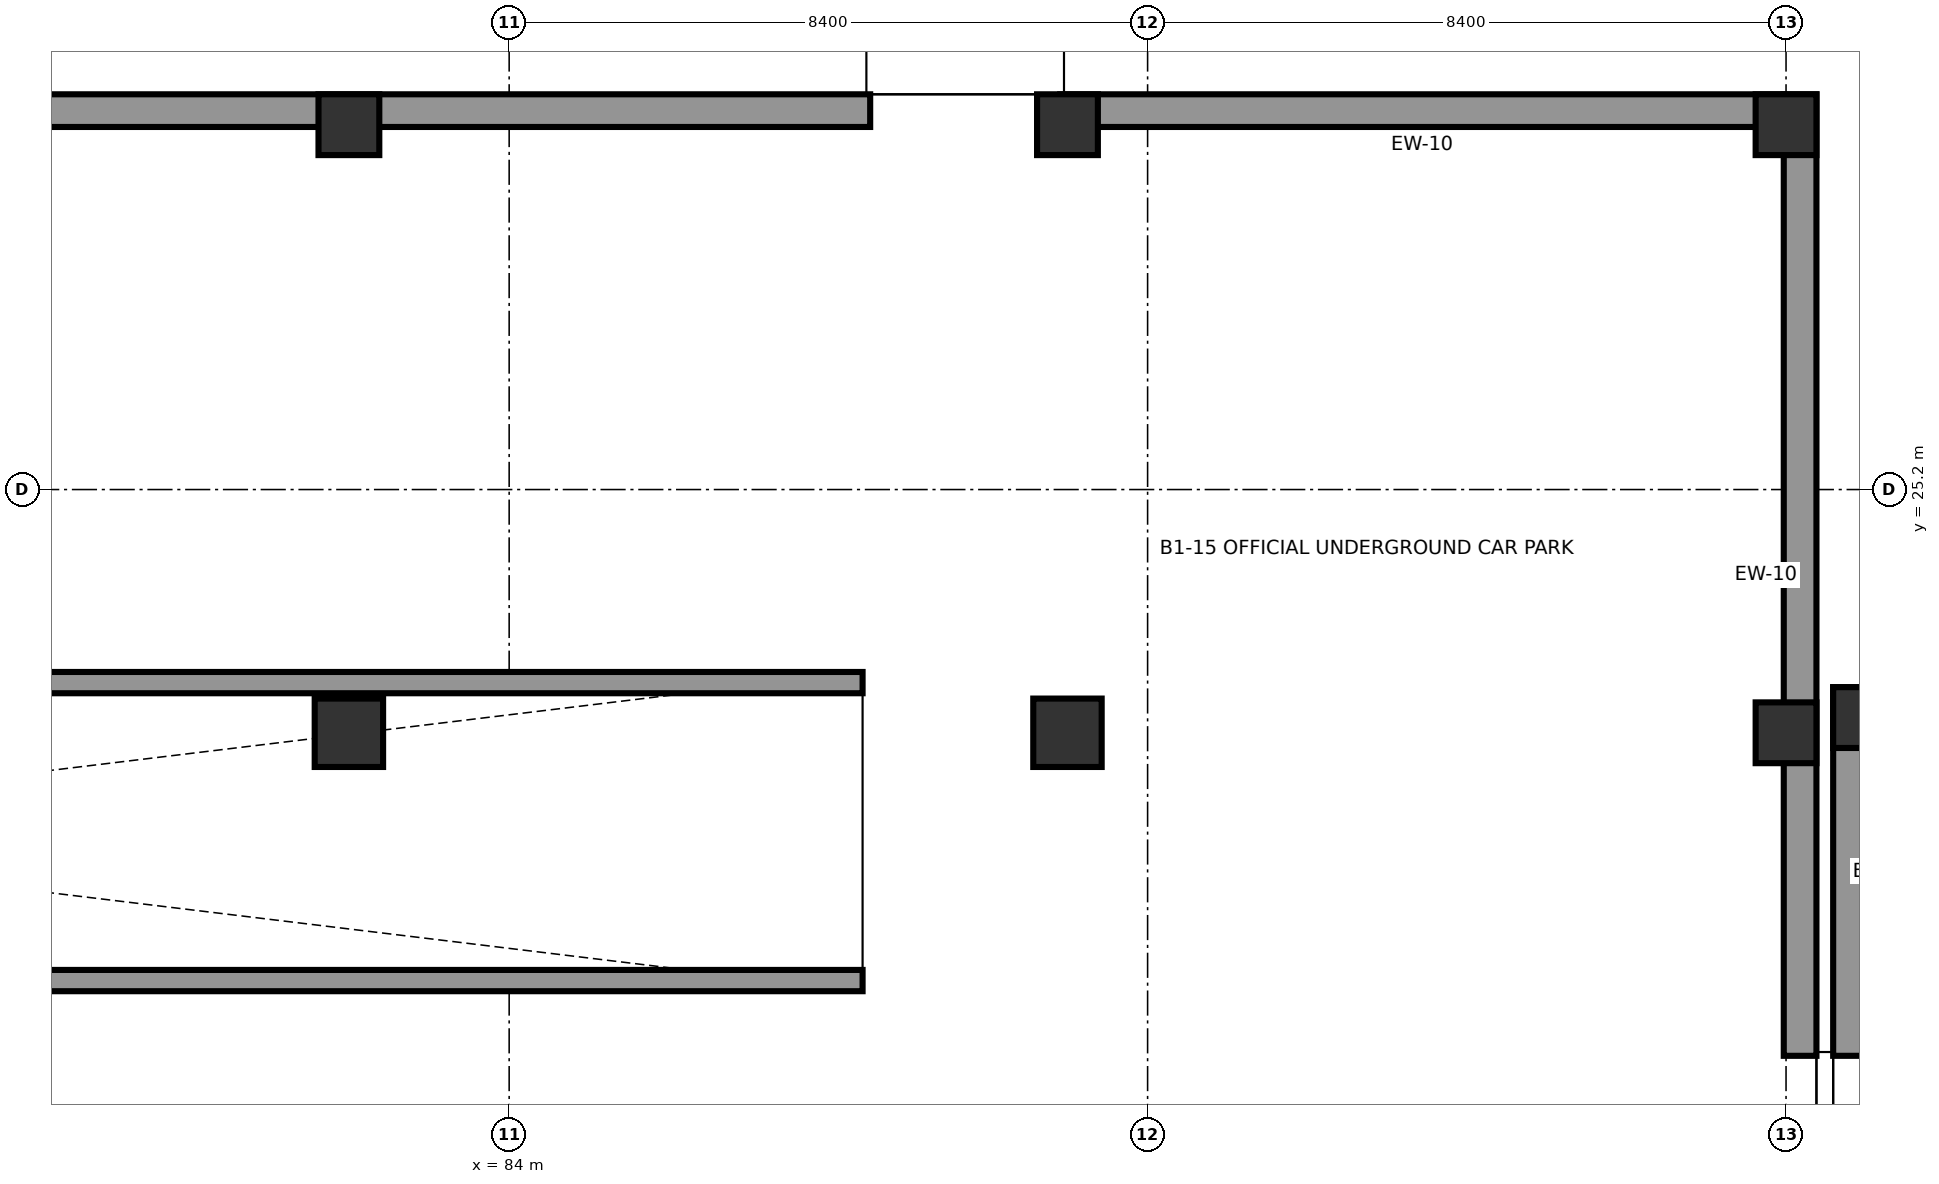
"""IFC4 building model, lengths in metres.
Left out: names, types, materials, properties, quantities, classifications, styles, units other than length and angle.
Written with IfcOpenShell. Run it as: python <this file> out.ifc"""

import sys

from ifc_helpers import new_model, si_unit, direction, frame, frame_2d, origin, origin_2d, place, context, subcontext, project, spatial, rectangle, extrude, element, save


model = new_model("IFC4")
c1 = context("Model", 3, precision=1e-05, world=origin(), true_north=direction((0.0, 1.0)))
c2 = subcontext(c1, "Body", "Model", "MODEL_VIEW")
j1 = project(units=[si_unit("LENGTHUNIT", "METRE"), si_unit("PLANEANGLEUNIT", "RADIAN")], contexts=[c1])
p1 = place(None, origin())
s1 = spatial("IfcSite", under=j1, at=p1, CompositionType="ELEMENT")
p2 = place(p1, origin())
s2 = spatial("IfcBuilding", under=s1, at=p2, CompositionType="ELEMENT")
p3 = place(p2, frame((0.0, 0.0, -4.2)))
s3 = spatial("IfcBuildingStorey", under=s2, at=p3, CompositionType="ELEMENT", Elevation=-4.2)
p4 = place(p3, frame((81.891, 22.0, 0.0), z_axis=(0.0, 0.0, 1.0), x_axis=(1.0, 0.0, 0.0)))
e1 = element("IfcColumn", 1, at=p4, inside=s3, PredefinedType="COLUMN", context=c2, shape_type="SweptSolid", body=[
    extrude(rectangle(XDim=0.9, YDim=0.9, at=origin_2d()), origin(), (0.0, 0.0, 1.0), 4.2),
])
p5 = place(p3, frame((81.891, 30.0, 0.0), z_axis=(0.0, 0.0, 1.0), x_axis=(1.0, 0.0, 0.0)))
e2 = element("IfcColumn", 2, at=p5, inside=s3, PredefinedType="COLUMN", context=c2, shape_type="SweptSolid", body=[
    extrude(rectangle(XDim=0.8, YDim=0.8, at=origin_2d()), origin(), (0.0, 0.0, 1.0), 4.2),
])
p6 = place(p3, frame((91.346, 22.0, 0.0), z_axis=(0.0, 0.0, 1.0), x_axis=(1.0, 0.0, 0.0)))
e3 = element("IfcColumn", 3, at=p6, inside=s3, PredefinedType="COLUMN", context=c2, shape_type="SweptSolid", body=[
    extrude(rectangle(XDim=0.9, YDim=0.9, at=origin_2d()), origin(), (0.0, 0.0, 1.0), 4.2),
])
for number, where, z_axis, x_axis in (
    (4, (91.346, 30.0, 0.0), (0.0, 0.0, 1.0), (1.0, 0.0, 0.0)),
    (5, (100.8, 22.0, 0.0), (0.0, 0.0, 1.0), (1.0, 0.0, 0.0)),
    (6, (100.8, 30.0, 0.0), (0.0, 0.0, 1.0), (1.0, 0.0, 0.0)),
    (7, (101.82, 22.2, 0.0), (0.0, 0.0, 1.0), (1.0, 0.0, 0.0)),
):
    element("IfcColumn", number, at=place(p3, frame(where, z_axis=z_axis, x_axis=x_axis)), inside=s3, PredefinedType="COLUMN", context=c2, shape_type="SweptSolid", body=[
        extrude(rectangle(XDim=0.8, YDim=0.8, at=origin_2d()), origin(), (0.0, 0.0, 1.0), 4.2),
    ])
p7 = place(p3, frame((100.985, 17.75, 0.0), z_axis=(0.0, 0.0, 1.0), x_axis=(0.0, 1.0, 0.0)))
e8 = element("IfcWall", 8, at=p7, inside=s3, PredefinedType="SOLIDWALL", context=c2, shape_type="SweptSolid", body=[
    extrude(rectangle(XDim=12.65, YDim=0.43, at=frame_2d((6.325, 0.0))), origin(), (0.0, 0.0, 1.0), 4.2),
])
p8 = place(p3, frame((100.775, 30.185, 0.0), z_axis=(0.0, 0.0, 1.0), x_axis=(-1.0, 0.0, 0.0)))
e9 = element("IfcWall", 9, at=p8, inside=s3, PredefinedType="SOLIDWALL", context=c2, shape_type="SweptSolid", body=[
    extrude(rectangle(XDim=9.525, YDim=0.43, at=frame_2d((4.762, 0.0))), origin(), (0.0, 0.0, 1.0), 4.2),
])
p9 = place(p3, frame((88.75, 30.185, 0.0), z_axis=(0.0, 0.0, 1.0), x_axis=(-1.0, 0.0, 0.0)))
e10 = element("IfcWall", 10, at=p9, inside=s3, PredefinedType="SOLIDWALL", context=c2, shape_type="SweptSolid", body=[
    extrude(rectangle(XDim=54.105, YDim=0.43, at=frame_2d((27.052, 0.0))), origin(), (0.0, 0.0, 1.0), 4.2),
])
p10 = place(p3, frame((101.635, 22.6, 0.0), z_axis=(0.0, 0.0, 1.0), x_axis=(0.0, -1.0, 0.0)))
e11 = element("IfcWall", 11, at=p10, inside=s3, PredefinedType="SOLIDWALL", context=c2, shape_type="SweptSolid", body=[
    extrude(rectangle(XDim=4.85, YDim=0.43, at=frame_2d((2.425, 0.0))), origin(), (0.0, 0.0, 1.0), 4.2),
])
for number, where, z_axis, x_axis in (
    (12, (54.0, 18.74, 0.0), (0.0, 0.0, 1.0), (1.0, 0.0, 0.0)),
    (13, (54.0, 22.66, 0.0), (0.0, 0.0, 1.0), (1.0, 0.0, 0.0)),
):
    element("IfcWall", number, at=place(p3, frame(where, z_axis=z_axis, x_axis=x_axis)), inside=s3, PredefinedType="SOLIDWALL", context=c2, shape_type="SweptSolid", body=[
        extrude(rectangle(XDim=34.65, YDim=0.28, at=frame_2d((17.325, 0.0))), origin(), (0.0, 0.0, 1.0), 4.2),
    ])
save(model, sys.argv[1])
